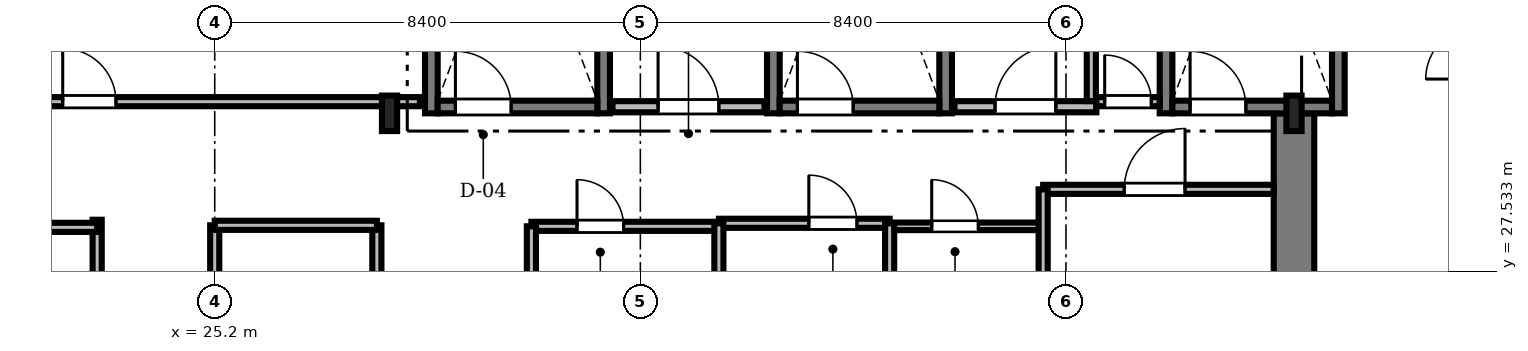
"""IFC4 building model, lengths in metres.
Left out: names, types, materials, properties, quantities, classifications, styles, units other than length and angle.
Written with IfcOpenShell. Run it as: python <this file> out.ifc"""

import sys

from ifc_helpers import new_model, si_unit, direction, frame, frame_2d, origin, origin_2d, place, context, subcontext, project, spatial, rectangle, i_section, extrude, source, transform, mapped, element, fill, save


model = new_model("IFC4")
c1 = context("Model", 3, precision=1e-05, world=origin(), true_north=direction((0.0, 1.0)))
c2 = subcontext(c1, "Body", "Model", "MODEL_VIEW")
j1 = project(units=[si_unit("LENGTHUNIT", "METRE"), si_unit("PLANEANGLEUNIT", "RADIAN")], contexts=[c1])
p1 = place(None, origin())
s1 = spatial("IfcSite", under=j1, at=p1, CompositionType="ELEMENT")
p2 = place(p1, origin())
s2 = spatial("IfcBuilding", under=s1, at=p2, CompositionType="ELEMENT")
p3 = place(p2, frame((0.0, 0.0, 229.8)))
s3 = spatial("IfcBuildingStorey", under=s2, at=p3, CompositionType="ELEMENT", Elevation=229.8)
m1 = source(origin(), c2, "Body", "SweptSolid", [
    extrude(rectangle(XDim=13.15, YDim=0.8, at=frame_2d((6.575, 0.0))), origin(), (0.0, 0.0, 1.0), 3.53),
])
p4 = place(p3, frame((46.5, 17.5, 0.0), z_axis=(0.0, 0.0, 1.0), x_axis=(0.0, 1.0, 0.0)))
e1 = element("IfcWall", 1, at=p4, inside=s3, PredefinedType="SHEAR", context=c2, shape_type="MappedRepresentation", body=[
    mapped(m1, transform((0.0, 0.0, 0.0), scale=1.0)),
])
m2 = source(origin(), c2, "Body", "SweptSolid", [
    extrude(i_section(OverallWidth=0.3, OverallDepth=0.7, WebThickness=0.017, FlangeThickness=0.032, FilletRadius=0.027, at=origin_2d()), origin(), (0.0, 0.0, 1.0), 3.53),
])
for number, where, z_axis, x_axis in (
    (2, (28.65, 30.65, 0.0), (0.0, 0.0, 1.0), (1.0, 0.0, 0.0)),
    (3, (46.5, 30.65, 0.0), (0.0, 0.0, 1.0), (1.0, 0.0, 0.0)),
):
    element("IfcColumn", number, at=place(p3, frame(where, z_axis=z_axis, x_axis=x_axis)), inside=s3, PredefinedType="COLUMN", context=c2, shape_type="MappedRepresentation", body=[
        mapped(m2, transform((0.0, 0.0, 0.0), scale=1.0)),
    ])
m3 = source(origin(), c2, "Body", "SweptSolid", [
    extrude(rectangle(XDim=9.25, YDim=0.25, at=frame_2d((4.625, 0.0))), origin(), (0.0, 0.0, 1.0), 3.55),
])
for number, where, z_axis, x_axis in (
    (4, (29.475, 30.65, 0.0), (0.0, 0.0, 1.0), (0.0, 1.0, 0.0)),
    (5, (32.875, 30.65, 0.0), (0.0, 0.0, 1.0), (0.0, 1.0, 0.0)),
):
    element("IfcWall", number, at=place(p3, frame(where, z_axis=z_axis, x_axis=x_axis)), inside=s3, PredefinedType="SOLIDWALL", context=c2, shape_type="MappedRepresentation", body=[
        mapped(m3, transform((0.0, 0.0, 0.0), scale=1.0)),
    ])
m4 = source(origin(), c2, "Body", "SweptSolid", [
    extrude(rectangle(XDim=3.15, YDim=0.25, at=frame_2d((1.575, 0.0))), origin(), (0.0, 0.0, 1.0), 3.55),
])
p5 = place(p3, frame((29.6, 30.775, 0.0), z_axis=(0.0, 0.0, 1.0), x_axis=(1.0, 0.0, 0.0)))
e6 = element("IfcWall", 6, at=p5, inside=s3, PredefinedType="SOLIDWALL", context=c2, shape_type="MappedRepresentation", body=[
    mapped(m4, transform((0.0, 0.0, 0.0), scale=1.0)),
])
m5 = source(origin(), c2, "Body", "SweptSolid", [
    extrude(rectangle(XDim=1.1, YDim=2.2, at=frame_2d((0.55, 1.1))), frame((0.0, 0.135, 0.0), z_axis=(0.0, -1.0, 0.0), x_axis=(1.0, 0.0, 0.0)), (0.0, 0.0, 1.0), 0.27),
])
p6 = place(p5, frame((0.35, 0.0, 0.0)))
e7 = element("IfcOpeningElement", 7, at=p6, cuts=e6, PredefinedType="OPENING", context=c2, shape_type="MappedRepresentation", body=[
    mapped(m5, transform((0.0, 0.0, 0.0), scale=1.0)),
])
for number, where, z_axis, x_axis in (
    (8, (36.225, 30.65, 0.0), (0.0, 0.0, 1.0), (0.0, 1.0, 0.0)),
    (9, (39.625, 30.65, 0.0), (0.0, 0.0, 1.0), (0.0, 1.0, 0.0)),
):
    element("IfcWall", number, at=place(p3, frame(where, z_axis=z_axis, x_axis=x_axis)), inside=s3, PredefinedType="SOLIDWALL", context=c2, shape_type="MappedRepresentation", body=[
        mapped(m3, transform((0.0, 0.0, 0.0), scale=1.0)),
    ])
p7 = place(p3, frame((36.35, 30.775, 0.0), z_axis=(0.0, 0.0, 1.0), x_axis=(1.0, 0.0, 0.0)))
e10 = element("IfcWall", 10, at=p7, inside=s3, PredefinedType="SOLIDWALL", context=c2, shape_type="MappedRepresentation", body=[
    mapped(m4, transform((0.0, 0.0, 0.0), scale=1.0)),
])
p8 = place(p7, frame((0.35, 0.0, 0.0)))
e11 = element("IfcOpeningElement", 11, at=p8, cuts=e10, PredefinedType="OPENING", context=c2, shape_type="MappedRepresentation", body=[
    mapped(m5, transform((0.0, 0.0, 0.0), scale=1.0)),
])
for number, where, z_axis, x_axis in (
    (12, (43.975, 30.65, 0.0), (0.0, 0.0, 1.0), (0.0, 1.0, 0.0)),
    (13, (47.375, 30.65, 0.0), (0.0, 0.0, 1.0), (0.0, 1.0, 0.0)),
):
    element("IfcWall", number, at=place(p3, frame(where, z_axis=z_axis, x_axis=x_axis)), inside=s3, PredefinedType="SOLIDWALL", context=c2, shape_type="MappedRepresentation", body=[
        mapped(m3, transform((0.0, 0.0, 0.0), scale=1.0)),
    ])
p9 = place(p3, frame((44.1, 30.775, 0.0), z_axis=(0.0, 0.0, 1.0), x_axis=(1.0, 0.0, 0.0)))
e14 = element("IfcWall", 14, at=p9, inside=s3, PredefinedType="SOLIDWALL", context=c2, shape_type="MappedRepresentation", body=[
    mapped(m4, transform((0.0, 0.0, 0.0), scale=1.0)),
])
p10 = place(p9, frame((0.35, 0.0, 0.0)))
e15 = element("IfcOpeningElement", 15, at=p10, cuts=e14, PredefinedType="OPENING", context=c2, shape_type="MappedRepresentation", body=[
    mapped(m5, transform((0.0, 0.0, 0.0), scale=1.0)),
])
m6 = source(origin(), c2, "Body", "SweptSolid", [
    extrude(rectangle(XDim=3.0, YDim=0.22, at=frame_2d((1.5, 0.0))), origin(), (0.0, 0.0, 1.0), 3.53),
])
p11 = place(p3, frame((33.05, 30.78, 0.0), z_axis=(0.0, 0.0, 1.0), x_axis=(1.0, 0.0, 0.0)))
e16 = element("IfcWall", 16, at=p11, inside=s3, PredefinedType="SOLIDWALL", context=c2, shape_type="MappedRepresentation", body=[
    mapped(m6, transform((0.0, 0.0, 0.0), scale=1.0)),
])
m7 = source(origin(), c2, "Body", "SweptSolid", [
    extrude(rectangle(XDim=1.2, YDim=2.2, at=frame_2d((0.6, 1.1))), frame((0.0, 0.12, 0.0), z_axis=(0.0, -1.0, 0.0), x_axis=(1.0, 0.0, 0.0)), (0.0, 0.0, 1.0), 0.24),
])
p12 = place(p11, frame((0.9, 0.0, 0.0)))
e17 = element("IfcOpeningElement", 17, at=p12, cuts=e16, PredefinedType="OPENING", context=c2, shape_type="MappedRepresentation", body=[
    mapped(m7, transform((0.0, 0.0, 0.0), scale=1.0)),
])
m8 = source(origin(), c2, "Body", "SweptSolid", [
    extrude(rectangle(XDim=2.8, YDim=0.22, at=frame_2d((1.4, 0.0))), origin(), (0.0, 0.0, 1.0), 3.53),
])
p13 = place(p3, frame((39.8, 30.78, 0.0), z_axis=(0.0, 0.0, 1.0), x_axis=(1.0, 0.0, 0.0)))
e18 = element("IfcWall", 18, at=p13, inside=s3, PredefinedType="SOLIDWALL", context=c2, shape_type="MappedRepresentation", body=[
    mapped(m8, transform((0.0, 0.0, 0.0), scale=1.0)),
])
p14 = place(p13, frame((0.8, 0.0, 0.0)))
e19 = element("IfcOpeningElement", 19, at=p14, cuts=e18, PredefinedType="OPENING", context=c2, shape_type="MappedRepresentation", body=[
    mapped(m7, transform((0.0, 0.0, 0.0), scale=1.0)),
])
m9 = source(origin(), c2, "Body", "SweptSolid", [
    extrude(rectangle(XDim=17.828, YDim=0.18, at=frame_2d((8.914, 0.0))), origin(), (0.0, 0.0, 1.0), 2.772),
])
p15 = place(p3, frame((11.422, 30.88, 0.0), z_axis=(0.0, 0.0, 1.0), x_axis=(1.0, 0.0, 0.0)))
e20 = element("IfcWall", 20, at=p15, inside=s3, PredefinedType="PARTITIONING", context=c2, shape_type="MappedRepresentation", body=[
    mapped(m9, transform((0.0, 0.0, 0.0), scale=1.0)),
])
m10 = source(origin(), c2, "Body", "SweptSolid", [
    extrude(rectangle(XDim=1.05, YDim=2.2, at=frame_2d((0.525, 1.1))), frame((0.0, 0.1, 0.0), z_axis=(0.0, -1.0, 0.0), x_axis=(1.0, 0.0, 0.0)), (0.0, 0.0, 1.0), 0.2),
])
p16 = place(p15, frame((10.778, 0.0, 0.0)))
e21 = element("IfcOpeningElement", 21, at=p16, cuts=e20, PredefinedType="OPENING", context=c2, shape_type="MappedRepresentation", body=[
    mapped(m10, transform((0.0, 0.0, 0.0), scale=1.0)),
])
m11 = source(origin(), c2, "Body", "SweptSolid", [
    extrude(rectangle(XDim=4.548, YDim=0.18, at=frame_2d((2.274, 0.0))), origin(), (0.0, 0.0, 1.0), 3.162),
])
p17 = place(p3, frame((41.55, 29.15, 0.0), z_axis=(0.0, 0.0, 1.0), x_axis=(1.0, 0.0, 0.0)))
e22 = element("IfcWall", 22, at=p17, inside=s3, PredefinedType="PARTITIONING", context=c2, shape_type="MappedRepresentation", body=[
    mapped(m11, transform((0.0, 0.0, 0.0), scale=1.0)),
])
m12 = source(origin(), c2, "Body", "SweptSolid", [
    extrude(rectangle(XDim=1.2, YDim=2.2, at=frame_2d((0.6, 1.1))), frame((0.0, 0.1, 0.0), z_axis=(0.0, -1.0, 0.0), x_axis=(1.0, 0.0, 0.0)), (0.0, 0.0, 1.0), 0.2),
])
p18 = place(p17, frame((1.6, 0.0, 0.0)))
e23 = element("IfcOpeningElement", 23, at=p18, cuts=e22, PredefinedType="OPENING", context=c2, shape_type="MappedRepresentation", body=[
    mapped(m12, transform((0.0, 0.0, 0.0), scale=1.0)),
])
m13 = source(origin(), c2, "Body", "SweptSolid", [
    extrude(rectangle(XDim=4.24, YDim=0.18, at=frame_2d((2.12, 0.0))), origin(), (0.0, 0.0, 1.0), 2.972),
])
p19 = place(p3, frame((25.2, 24.2, 0.0), z_axis=(0.0, 0.0, 1.0), x_axis=(0.0, 1.0, 0.0)))
e24 = element("IfcWall", 24, at=p19, inside=s3, PredefinedType="PARTITIONING", context=c2, shape_type="MappedRepresentation", body=[
    mapped(m13, transform((0.0, 0.0, 0.0), scale=1.0)),
])
p20 = place(p19, frame((1.4, 0.0, 0.0)))
e25 = element("IfcOpeningElement", 25, at=p20, cuts=e24, PredefinedType="OPENING", context=c2, shape_type="MappedRepresentation", body=[
    mapped(m10, transform((0.0, 0.0, 0.0), scale=1.0)),
])
m14 = source(origin(), c2, "Body", "SweptSolid", [
    extrude(rectangle(XDim=3.7, YDim=0.18, at=frame_2d((1.85, 0.0))), origin(), (0.0, 0.0, 1.0), 3.162),
])
p21 = place(p3, frame((31.45, 28.42, 0.0), z_axis=(0.0, 0.0, 1.0), x_axis=(1.0, 0.0, 0.0)))
e26 = element("IfcWall", 26, at=p21, inside=s3, PredefinedType="PARTITIONING", context=c2, shape_type="MappedRepresentation", body=[
    mapped(m14, transform((0.0, 0.0, 0.0), scale=1.0)),
])
m15 = source(origin(), c2, "Body", "SweptSolid", [
    extrude(rectangle(XDim=0.92, YDim=2.1, at=frame_2d((0.46, 1.05))), frame((0.0, 0.1, 0.0), z_axis=(0.0, -1.0, 0.0), x_axis=(1.0, 0.0, 0.0)), (0.0, 0.0, 1.0), 0.2),
])
p22 = place(p21, frame((0.9, 0.0, 0.0)))
e27 = element("IfcOpeningElement", 27, at=p22, cuts=e26, PredefinedType="OPENING", context=c2, shape_type="MappedRepresentation", body=[
    mapped(m15, transform((0.0, 0.0, 0.0), scale=1.0)),
])
m16 = source(origin(), c2, "Body", "SweptSolid", [
    extrude(rectangle(XDim=3.37, YDim=0.18, at=frame_2d((1.685, 0.0))), origin(), (0.0, 0.0, 1.0), 3.53),
])
p23 = place(p3, frame((35.15, 28.48, 0.0), z_axis=(0.0, 0.0, 1.0), x_axis=(1.0, 0.0, 0.0)))
e28 = element("IfcWall", 28, at=p23, inside=s3, PredefinedType="PARTITIONING", context=c2, shape_type="MappedRepresentation", body=[
    mapped(m16, transform((0.0, 0.0, 0.0), scale=1.0)),
])
m17 = source(origin(), c2, "Body", "SweptSolid", [
    extrude(rectangle(XDim=0.95, YDim=2.15, at=frame_2d((0.475, 1.075))), frame((0.0, 0.1, 0.0), z_axis=(0.0, -1.0, 0.0), x_axis=(1.0, 0.0, 0.0)), (0.0, 0.0, 1.0), 0.2),
])
p24 = place(p23, frame((1.775, 0.0, 0.0)))
e29 = element("IfcOpeningElement", 29, at=p24, cuts=e28, PredefinedType="OPENING", context=c2, shape_type="MappedRepresentation", body=[
    mapped(m17, transform((0.0, 0.0, 0.0), scale=1.0)),
])
m18 = source(origin(), c2, "Body", "SweptSolid", [
    extrude(rectangle(XDim=3.0, YDim=0.15, at=frame_2d((1.5, 0.0))), origin(), (0.0, 0.0, 1.0), 3.53),
])
p25 = place(p3, frame((38.52, 28.42, 0.0), z_axis=(0.0, 0.0, 1.0), x_axis=(1.0, 0.0, 0.0)))
e30 = element("IfcWall", 30, at=p25, inside=s3, PredefinedType="PARTITIONING", context=c2, shape_type="MappedRepresentation", body=[
    mapped(m18, transform((0.0, 0.0, 0.0), scale=1.0)),
])
m19 = source(origin(), c2, "Body", "SweptSolid", [
    extrude(rectangle(XDim=0.92, YDim=2.1, at=frame_2d((0.46, 1.05))), frame((0.0, 0.085, 0.0), z_axis=(0.0, -1.0, 0.0), x_axis=(1.0, 0.0, 0.0)), (0.0, 0.0, 1.0), 0.17),
])
p26 = place(p25, frame((0.83, 0.0, 0.0)))
e31 = element("IfcOpeningElement", 31, at=p26, cuts=e30, PredefinedType="OPENING", context=c2, shape_type="MappedRepresentation", body=[
    mapped(m19, transform((0.0, 0.0, 0.0), scale=1.0)),
])
m20 = source(origin(), c2, "Body", "SweptSolid", [
    extrude(rectangle(XDim=1.248, YDim=0.18, at=frame_2d((0.624, 0.0))), origin(), (0.0, 0.0, 1.0), 3.53),
])
p27 = place(p3, frame((42.6, 30.88, 0.0), z_axis=(0.0, 0.0, 1.0), x_axis=(1.0, 0.0, 0.0)))
e32 = element("IfcWall", 32, at=p27, inside=s3, PredefinedType="PARTITIONING", context=c2, shape_type="MappedRepresentation", body=[
    mapped(m20, transform((0.0, 0.0, 0.0), scale=1.0)),
])
p28 = place(p27, frame((0.164, 0.0, 0.0)))
e33 = element("IfcOpeningElement", 33, at=p28, cuts=e32, PredefinedType="OPENING", context=c2, shape_type="MappedRepresentation", body=[
    mapped(m15, transform((0.0, 0.0, 0.0), scale=1.0)),
])
m21 = source(origin(), c2, "Body", "SweptSolid", [
    extrude(rectangle(XDim=14.92, YDim=0.18, at=frame_2d((7.46, 0.0))), origin(), (0.0, 0.0, 1.0), 2.972),
])
p29 = place(p3, frame((22.88, 13.63, 0.0), z_axis=(0.0, 0.0, 1.0), x_axis=(0.0, 1.0, 0.0)))
e34 = element("IfcWall", 34, at=p29, inside=s3, PredefinedType="PARTITIONING", context=c2, shape_type="MappedRepresentation", body=[
    mapped(m21, transform((0.0, 0.0, 0.0), scale=1.0)),
])
m22 = source(origin(), c2, "Body", "SweptSolid", [
    extrude(rectangle(XDim=11.65, YDim=0.18, at=frame_2d((5.825, 0.0))), origin(), (0.0, 0.0, 1.0), 2.772),
])
p30 = place(p3, frame((11.23, 28.4, 0.0), z_axis=(0.0, 0.0, 1.0), x_axis=(1.0, 0.0, 0.0)))
e35 = element("IfcWall", 35, at=p30, inside=s3, PredefinedType="PARTITIONING", context=c2, shape_type="MappedRepresentation", body=[
    mapped(m22, transform((0.0, 0.0, 0.0), scale=1.0)),
])
p31 = place(p3, frame((28.4, 24.2, 0.0), z_axis=(0.0, 0.0, 1.0), x_axis=(0.0, 1.0, 0.0)))
e36 = element("IfcWall", 36, at=p31, inside=s3, PredefinedType="PARTITIONING", context=c2, shape_type="MappedRepresentation", body=[
    mapped(m13, transform((0.0, 0.0, 0.0), scale=1.0)),
])
m23 = source(origin(), c2, "Body", "SweptSolid", [
    extrude(rectangle(XDim=3.2, YDim=0.18, at=frame_2d((1.6, 0.0))), origin(), (0.0, 0.0, 1.0), 3.53),
])
p32 = place(p3, frame((25.2, 28.44, 0.0), z_axis=(0.0, 0.0, 1.0), x_axis=(1.0, 0.0, 0.0)))
e37 = element("IfcWall", 37, at=p32, inside=s3, PredefinedType="PARTITIONING", context=c2, shape_type="MappedRepresentation", body=[
    mapped(m23, transform((0.0, 0.0, 0.0), scale=1.0)),
])
m24 = source(origin(), c2, "Body", "SweptSolid", [
    extrude(rectangle(XDim=2.35, YDim=0.18, at=frame_2d((1.175, 0.0))), origin(), (0.0, 0.0, 1.0), 2.972),
])
p33 = place(p3, frame((41.55, 26.8, 0.0), z_axis=(0.0, 0.0, 1.0), x_axis=(0.0, 1.0, 0.0)))
e38 = element("IfcWall", 38, at=p33, inside=s3, PredefinedType="PARTITIONING", context=c2, shape_type="MappedRepresentation", body=[
    mapped(m24, transform((0.0, 0.0, 0.0), scale=1.0)),
])
m25 = source(origin(), c2, "Body", "SweptSolid", [
    extrude(rectangle(XDim=1.858, YDim=0.18, at=frame_2d((0.929, 0.0))), origin(), (0.0, 0.0, 1.0), 3.53),
])
p34 = place(p3, frame((42.5, 30.892, 0.0), z_axis=(0.0, 0.0, 1.0), x_axis=(0.0, 1.0, 0.0)))
e39 = element("IfcWall", 39, at=p34, inside=s3, PredefinedType="PARTITIONING", context=c2, shape_type="MappedRepresentation", body=[
    mapped(m25, transform((0.0, 0.0, 0.0), scale=1.0)),
])
m26 = source(origin(), c2, "Body", "SweptSolid", [
    extrude(rectangle(XDim=1.66, YDim=0.18, at=frame_2d((0.83, 0.0))), origin(), (0.0, 0.0, 1.0), 3.072),
])
for number, where, z_axis, x_axis in (
    (40, (35.15, 26.82, 0.0), (0.0, 0.0, 1.0), (0.0, 1.0, 0.0)),
    (41, (38.52, 26.82, 0.0), (0.0, 0.0, 1.0), (0.0, 1.0, 0.0)),
):
    element("IfcWall", number, at=place(p3, frame(where, z_axis=z_axis, x_axis=x_axis)), inside=s3, PredefinedType="PARTITIONING", context=c2, shape_type="MappedRepresentation", body=[
        mapped(m26, transform((0.0, 0.0, 0.0), scale=1.0)),
    ])
m27 = source(origin(), c2, "Body", "SweptSolid", [
    extrude(rectangle(XDim=1.6, YDim=0.18, at=frame_2d((0.8, 0.0))), origin(), (0.0, 0.0, 1.0), 3.072),
])
p35 = place(p3, frame((31.45, 26.82, 0.0), z_axis=(0.0, 0.0, 1.0), x_axis=(0.0, 1.0, 0.0)))
e42 = element("IfcWall", 42, at=p35, inside=s3, PredefinedType="PARTITIONING", context=c2, shape_type="MappedRepresentation", body=[
    mapped(m27, transform((0.0, 0.0, 0.0), scale=1.0)),
])
m28 = source(origin(), c2, "Body", "SweptSolid", [
    extrude(rectangle(XDim=1.1, YDim=2.2, at=frame_2d((0.55, 1.1))), frame((0.0, 0.025, 0.0), z_axis=(0.0, -1.0, 0.0), x_axis=(1.0, 0.0, 0.0)), (0.0, 0.0, 1.0), 0.05),
])
p36 = place(p6, origin())
e43 = element("IfcDoor", 43, at=p36, inside=s3, OperationType="SINGLE_SWING_LEFT", PredefinedType="DOOR", context=c2, shape_type="MappedRepresentation", body=[
    mapped(m28, transform((0.0, 0.0, 0.0), scale=1.0)),
])
fill(e7, e43)
p37 = place(p8, origin())
e44 = element("IfcDoor", 44, at=p37, inside=s3, OperationType="SINGLE_SWING_LEFT", PredefinedType="DOOR", context=c2, shape_type="MappedRepresentation", body=[
    mapped(m28, transform((0.0, 0.0, 0.0), scale=1.0)),
])
fill(e11, e44)
p38 = place(p10, origin())
e45 = element("IfcDoor", 45, at=p38, inside=s3, OperationType="SINGLE_SWING_LEFT", PredefinedType="DOOR", context=c2, shape_type="MappedRepresentation", body=[
    mapped(m28, transform((0.0, 0.0, 0.0), scale=1.0)),
])
fill(e15, e45)
m29 = source(origin(), c2, "Body", "SweptSolid", [
    extrude(rectangle(XDim=1.2, YDim=2.2, at=frame_2d((0.6, 1.1))), frame((0.0, 0.025, 0.0), z_axis=(0.0, -1.0, 0.0), x_axis=(1.0, 0.0, 0.0)), (0.0, 0.0, 1.0), 0.05),
])
p39 = place(p12, origin())
e46 = element("IfcDoor", 46, at=p39, inside=s3, OperationType="SINGLE_SWING_LEFT", PredefinedType="DOOR", context=c2, shape_type="MappedRepresentation", body=[
    mapped(m29, transform((0.0, 0.0, 0.0), scale=1.0)),
])
fill(e17, e46)
p40 = place(p14, origin())
e47 = element("IfcDoor", 47, at=p40, inside=s3, OperationType="SINGLE_SWING_RIGHT", PredefinedType="DOOR", context=c2, shape_type="MappedRepresentation", body=[
    mapped(m29, transform((0.0, 0.0, 0.0), scale=1.0)),
])
fill(e19, e47)
m30 = source(origin(), c2, "Body", "SweptSolid", [
    extrude(rectangle(XDim=1.05, YDim=2.2, at=frame_2d((0.525, 1.1))), frame((0.0, 0.025, 0.0), z_axis=(0.0, -1.0, 0.0), x_axis=(1.0, 0.0, 0.0)), (0.0, 0.0, 1.0), 0.05),
])
p41 = place(p16, origin())
e48 = element("IfcDoor", 48, at=p41, inside=s3, OperationType="SINGLE_SWING_LEFT", PredefinedType="DOOR", context=c2, shape_type="MappedRepresentation", body=[
    mapped(m30, transform((0.0, 0.0, 0.0), scale=1.0)),
])
fill(e21, e48)
p42 = place(p18, origin())
e49 = element("IfcDoor", 49, at=p42, inside=s3, OperationType="SINGLE_SWING_RIGHT", PredefinedType="DOOR", context=c2, shape_type="MappedRepresentation", body=[
    mapped(m29, transform((0.0, 0.0, 0.0), scale=1.0)),
])
fill(e23, e49)
m31 = source(origin(), c2, "Body", "SweptSolid", [
    extrude(rectangle(XDim=0.92, YDim=2.1, at=frame_2d((0.46, 1.05))), frame((0.0, 0.025, 0.0), z_axis=(0.0, -1.0, 0.0), x_axis=(1.0, 0.0, 0.0)), (0.0, 0.0, 1.0), 0.05),
])
p43 = place(p22, origin())
e50 = element("IfcDoor", 50, at=p43, inside=s3, OperationType="SINGLE_SWING_LEFT", PredefinedType="DOOR", context=c2, shape_type="MappedRepresentation", body=[
    mapped(m31, transform((0.0, 0.0, 0.0), scale=1.0)),
])
fill(e27, e50)
m32 = source(origin(), c2, "Body", "SweptSolid", [
    extrude(rectangle(XDim=0.95, YDim=2.15, at=frame_2d((0.475, 1.075))), frame((0.0, 0.025, 0.0), z_axis=(0.0, -1.0, 0.0), x_axis=(1.0, 0.0, 0.0)), (0.0, 0.0, 1.0), 0.05),
])
p44 = place(p24, origin())
e51 = element("IfcDoor", 51, at=p44, inside=s3, OperationType="SINGLE_SWING_LEFT", PredefinedType="DOOR", context=c2, shape_type="MappedRepresentation", body=[
    mapped(m32, transform((0.0, 0.0, 0.0), scale=1.0)),
])
fill(e29, e51)
p45 = place(p26, origin())
e52 = element("IfcDoor", 52, at=p45, inside=s3, OperationType="SINGLE_SWING_LEFT", PredefinedType="DOOR", context=c2, shape_type="MappedRepresentation", body=[
    mapped(m31, transform((0.0, 0.0, 0.0), scale=1.0)),
])
fill(e31, e52)
p46 = place(p28, origin())
e53 = element("IfcDoor", 53, at=p46, inside=s3, OperationType="SINGLE_SWING_LEFT", PredefinedType="DOOR", context=c2, shape_type="MappedRepresentation", body=[
    mapped(m31, transform((0.0, 0.0, 0.0), scale=1.0)),
])
fill(e33, e53)
save(model, sys.argv[1])
